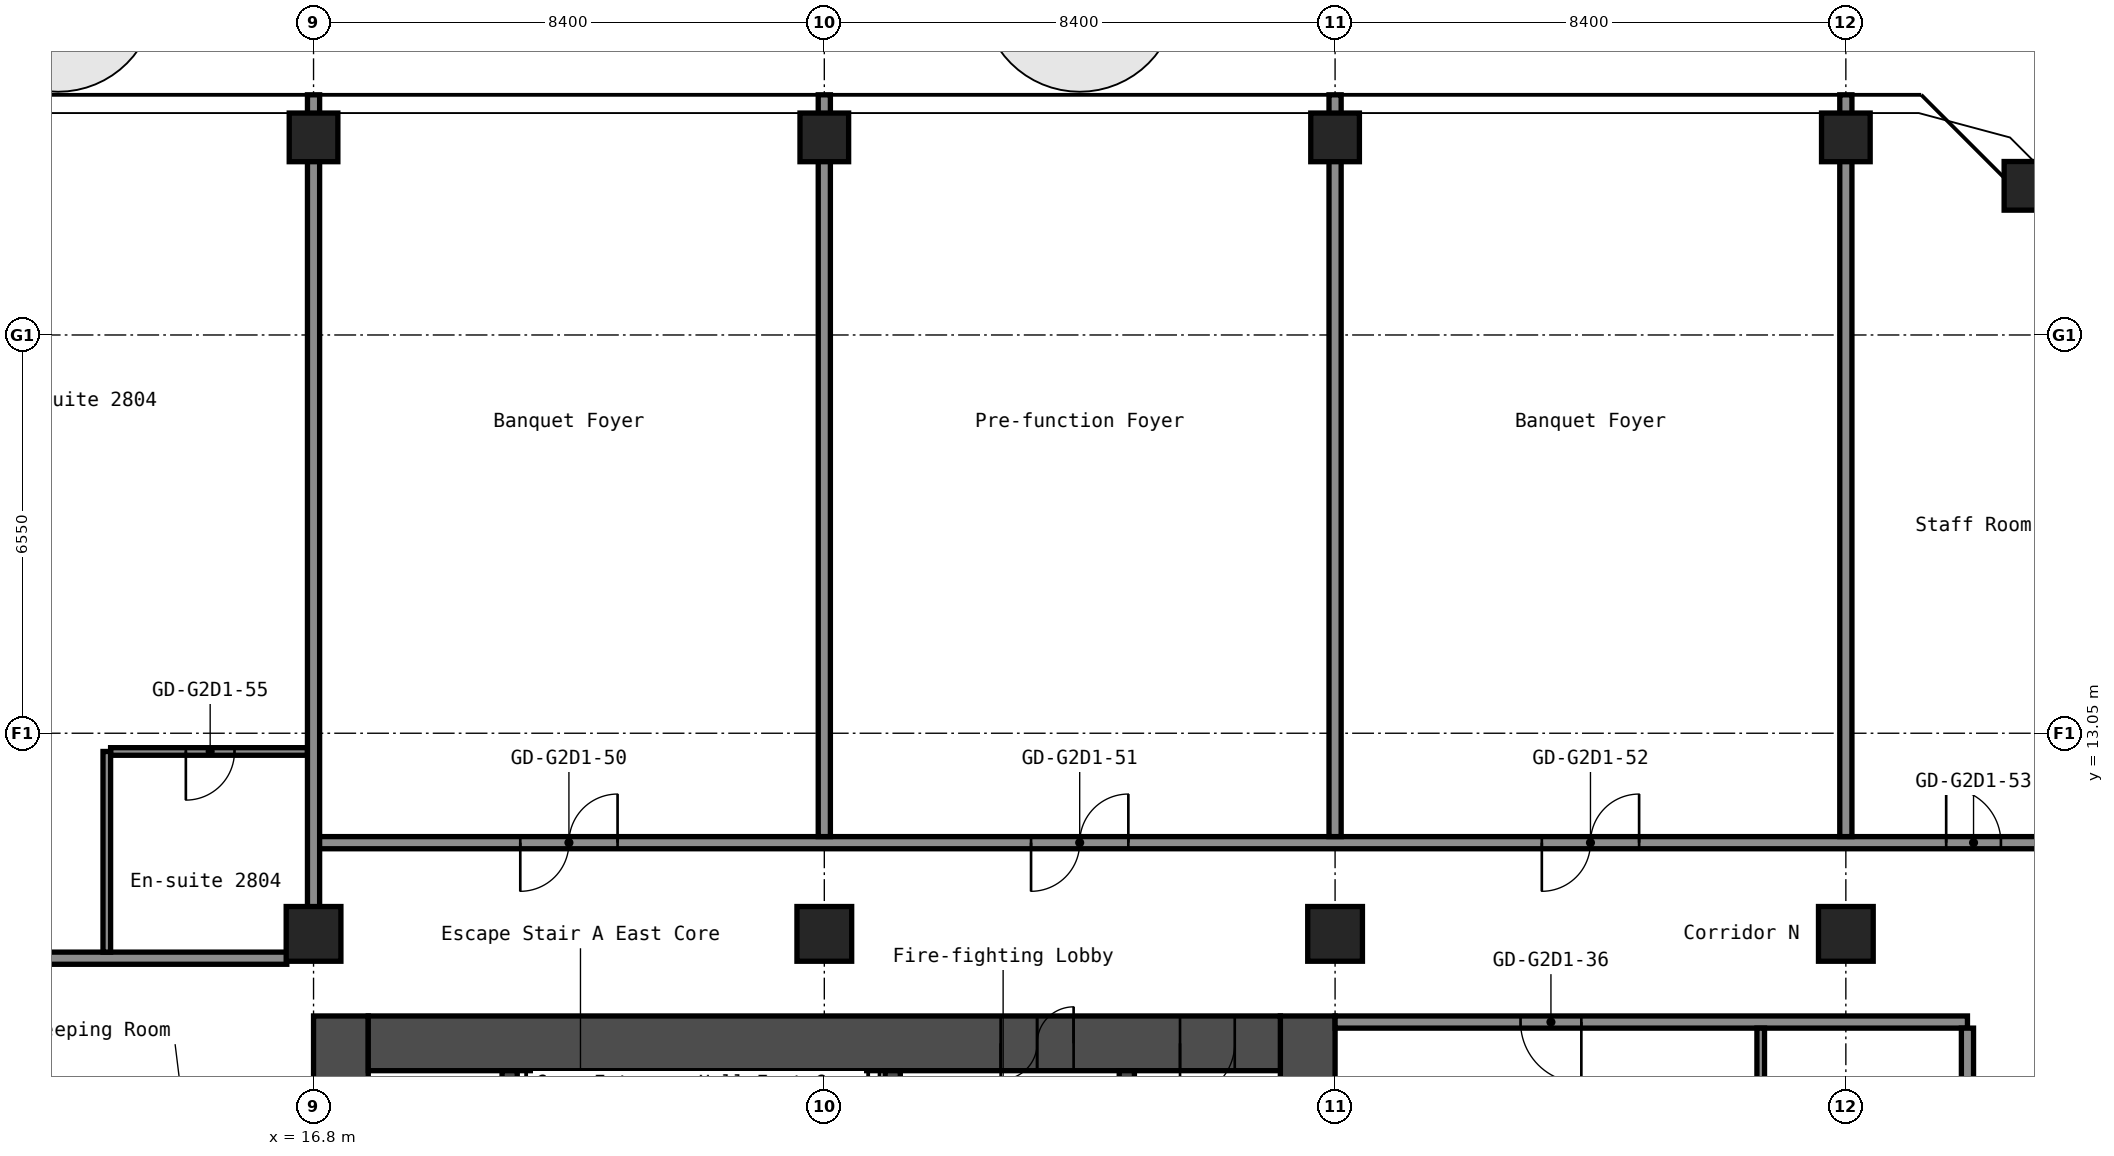
"""IFC4 building model, lengths in metres.
Left out: names, types, materials, properties, quantities, classifications, styles, units other than length and angle.
Written with IfcOpenShell. Run it as: python <this file> out.ifc"""

import sys

from ifc_helpers import new_model, si_unit, direction, frame, frame_2d, origin, origin_2d, place, context, subcontext, project, spatial, rectangle, hollow_rectangle, extrude, element, fill, save


model = new_model("IFC4")
c1 = context("Model", 3, precision=1e-05, world=origin(), true_north=direction((0.0, 1.0)))
c2 = subcontext(c1, "Body", "Model", "MODEL_VIEW")
j1 = project(units=[si_unit("LENGTHUNIT", "METRE"), si_unit("PLANEANGLEUNIT", "RADIAN")], contexts=[c1])
p1 = place(None, origin())
s1 = spatial("IfcSite", under=j1, at=p1, CompositionType="ELEMENT")
p2 = place(p1, origin())
s2 = spatial("IfcBuilding", under=s1, at=p2, CompositionType="ELEMENT")
p3 = place(p2, frame((0.0, 0.0, 101.0)))
s3 = spatial("IfcBuildingStorey", under=s2, at=p3, CompositionType="ELEMENT", Elevation=101.0)
p4 = place(p3, frame((16.8, 9.75, 0.0), z_axis=(0.0, 0.0, 1.0), x_axis=(1.0, 0.0, 0.0)))
e1 = element("IfcColumn", 1, at=p4, inside=s3, PredefinedType="COLUMN", context=c2, shape_type="SweptSolid", body=[
    extrude(hollow_rectangle(XDim=0.9, YDim=0.9, WallThickness=0.036, at=origin_2d()), origin(), (0.0, 0.0, 1.0), 2.8),
])
p5 = place(p3, frame((16.8, 22.85, 0.0), z_axis=(0.0, 0.0, 1.0), x_axis=(1.0, 0.0, 0.0)))
e2 = element("IfcColumn", 2, at=p5, inside=s3, PredefinedType="COLUMN", context=c2, shape_type="SweptSolid", body=[
    extrude(hollow_rectangle(XDim=0.8, YDim=0.8, WallThickness=0.032, at=origin_2d()), origin(), (0.0, 0.0, 1.0), 2.8),
])
p6 = place(p3, frame((25.2, 9.75, 0.0), z_axis=(0.0, 0.0, 1.0), x_axis=(1.0, 0.0, 0.0)))
e3 = element("IfcColumn", 3, at=p6, inside=s3, PredefinedType="COLUMN", context=c2, shape_type="SweptSolid", body=[
    extrude(hollow_rectangle(XDim=0.9, YDim=0.9, WallThickness=0.036, at=origin_2d()), origin(), (0.0, 0.0, 1.0), 2.8),
])
p7 = place(p3, frame((25.2, 22.85, 0.0), z_axis=(0.0, 0.0, 1.0), x_axis=(1.0, 0.0, 0.0)))
e4 = element("IfcColumn", 4, at=p7, inside=s3, PredefinedType="COLUMN", context=c2, shape_type="SweptSolid", body=[
    extrude(hollow_rectangle(XDim=0.8, YDim=0.8, WallThickness=0.032, at=origin_2d()), origin(), (0.0, 0.0, 1.0), 2.8),
])
p8 = place(p3, frame((33.6, 9.75, 0.0), z_axis=(0.0, 0.0, 1.0), x_axis=(1.0, 0.0, 0.0)))
e5 = element("IfcColumn", 5, at=p8, inside=s3, PredefinedType="COLUMN", context=c2, shape_type="SweptSolid", body=[
    extrude(hollow_rectangle(XDim=0.9, YDim=0.9, WallThickness=0.036, at=origin_2d()), origin(), (0.0, 0.0, 1.0), 2.8),
])
p9 = place(p3, frame((33.6, 22.85, 0.0), z_axis=(0.0, 0.0, 1.0), x_axis=(1.0, 0.0, 0.0)))
e6 = element("IfcColumn", 6, at=p9, inside=s3, PredefinedType="COLUMN", context=c2, shape_type="SweptSolid", body=[
    extrude(hollow_rectangle(XDim=0.8, YDim=0.8, WallThickness=0.032, at=origin_2d()), origin(), (0.0, 0.0, 1.0), 2.8),
])
p10 = place(p3, frame((42.0, 9.75, 0.0), z_axis=(0.0, 0.0, 1.0), x_axis=(1.0, 0.0, 0.0)))
e7 = element("IfcColumn", 7, at=p10, inside=s3, PredefinedType="COLUMN", context=c2, shape_type="SweptSolid", body=[
    extrude(hollow_rectangle(XDim=0.9, YDim=0.9, WallThickness=0.036, at=origin_2d()), origin(), (0.0, 0.0, 1.0), 2.8),
])
for number, where, z_axis, x_axis in (
    (8, (42.0, 22.85, 0.0), (0.0, 0.0, 1.0), (1.0, 0.0, 0.0)),
    (9, (45.003, 22.053, 0.0), (0.0, 0.0, 1.0), (1.0, 0.0, 0.0)),
):
    element("IfcColumn", number, at=place(p3, frame(where, z_axis=z_axis, x_axis=x_axis)), inside=s3, PredefinedType="COLUMN", context=c2, shape_type="SweptSolid", body=[
        extrude(hollow_rectangle(XDim=0.8, YDim=0.8, WallThickness=0.032, at=origin_2d()), origin(), (0.0, 0.0, 1.0), 2.8),
    ])
p11 = place(p3, frame((17.25, -8.4, 0.0), z_axis=(0.0, 0.0, 1.0), x_axis=(0.0, 1.0, 0.0)))
e10 = element("IfcWall", 10, at=p11, inside=s3, PredefinedType="SHEAR", context=c2, shape_type="SweptSolid", body=[
    extrude(rectangle(XDim=16.8, YDim=0.9, at=frame_2d((8.4, 0.0))), origin(), (0.0, 0.0, 1.0), 2.8),
])
p12 = place(p11, frame((7.6, 0.0, 0.0)))
e11 = element("IfcOpeningElement", 11, at=p12, cuts=e10, PredefinedType="OPENING", context=c2, shape_type="SweptSolid", body=[
    extrude(rectangle(XDim=1.2, YDim=2.1, at=frame_2d((0.6, 1.05))), frame((0.0, 0.46, 0.0), z_axis=(0.0, -1.0, 0.0), x_axis=(1.0, 0.0, 0.0)), (0.0, 0.0, 1.0), 0.92),
])
p13 = place(p3, frame((33.15, -8.4, 0.0), z_axis=(0.0, 0.0, 1.0), x_axis=(0.0, 1.0, 0.0)))
e12 = element("IfcWall", 12, at=p13, inside=s3, PredefinedType="SHEAR", context=c2, shape_type="SweptSolid", body=[
    extrude(rectangle(XDim=16.8, YDim=0.9, at=frame_2d((8.4, 0.0))), origin(), (0.0, 0.0, 1.0), 2.8),
])
p14 = place(p3, frame((17.7, 7.95, 0.0), z_axis=(0.0, 0.0, 1.0), x_axis=(1.0, 0.0, 0.0)))
e13 = element("IfcWall", 13, at=p14, inside=s3, PredefinedType="SHEAR", context=c2, shape_type="SweptSolid", body=[
    extrude(rectangle(XDim=15.0, YDim=0.9, at=frame_2d((7.5, 0.0))), origin(), (0.0, 0.0, 1.0), 2.8),
])
p15 = place(p14, frame((10.4, 0.0, 0.0)))
e14 = element("IfcOpeningElement", 14, at=p15, cuts=e13, PredefinedType="OPENING", context=c2, shape_type="SweptSolid", body=[
    extrude(rectangle(XDim=1.2, YDim=2.1, at=frame_2d((0.6, 1.05))), frame((0.0, 0.46, 0.0), z_axis=(0.0, -1.0, 0.0), x_axis=(1.0, 0.0, 0.0)), (0.0, 0.0, 1.0), 0.92),
])
p16 = place(p14, frame((13.35, 0.0, 0.0)))
e15 = element("IfcOpeningElement", 15, at=p16, cuts=e13, PredefinedType="OPENING", context=c2, shape_type="SweptSolid", body=[
    extrude(rectangle(XDim=0.9, YDim=2.1, at=frame_2d((0.45, 1.05))), frame((0.0, 0.46, 0.0), z_axis=(0.0, -1.0, 0.0), x_axis=(1.0, 0.0, 0.0)), (0.0, 0.0, 1.0), 0.92),
])
p17 = place(p3, frame((20.025, 1.2, 0.0), z_axis=(0.0, 0.0, 1.0), x_axis=(0.0, 1.0, 0.0)))
e16 = element("IfcWall", 16, at=p17, inside=s3, PredefinedType="SHEAR", context=c2, shape_type="SweptSolid", body=[
    extrude(rectangle(XDim=6.3, YDim=0.25, at=frame_2d((3.15, 0.0))), origin(), (0.0, 0.0, 1.0), 2.8),
])
p18 = place(p3, frame((26.325, 3.75, 0.0), z_axis=(0.0, 0.0, 1.0), x_axis=(0.0, 1.0, 0.0)))
e17 = element("IfcWall", 17, at=p18, inside=s3, PredefinedType="SHEAR", context=c2, shape_type="SweptSolid", body=[
    extrude(rectangle(XDim=3.75, YDim=0.25, at=frame_2d((1.875, 0.0))), origin(), (0.0, 0.0, 1.0), 2.8),
])
p19 = place(p18, frame((1.25, 0.0, 0.0)))
e18 = element("IfcOpeningElement", 18, at=p19, cuts=e17, PredefinedType="OPENING", context=c2, shape_type="SweptSolid", body=[
    extrude(rectangle(XDim=1.2, YDim=2.1, at=frame_2d((0.6, 1.05))), frame((0.0, 0.135, 0.0), z_axis=(0.0, -1.0, 0.0), x_axis=(1.0, 0.0, 0.0)), (0.0, 0.0, 1.0), 0.27),
])
p20 = place(p3, frame((30.175, 1.45, 0.0), z_axis=(0.0, 0.0, 1.0), x_axis=(0.0, 1.0, 0.0)))
e19 = element("IfcWall", 19, at=p20, inside=s3, PredefinedType="SHEAR", context=c2, shape_type="SweptSolid", body=[
    extrude(rectangle(XDim=6.05, YDim=0.25, at=frame_2d((3.025, 0.0))), origin(), (0.0, 0.0, 1.0), 2.8),
])
p21 = place(p20, frame((2.625, 0.0, 0.0)))
e20 = element("IfcOpeningElement", 20, at=p21, cuts=e19, PredefinedType="OPENING", context=c2, shape_type="SweptSolid", body=[
    extrude(rectangle(XDim=1.1, YDim=2.1, at=frame_2d((0.55, 1.05))), frame((0.0, 0.135, 0.0), z_axis=(0.0, -1.0, 0.0), x_axis=(1.0, 0.0, 0.0)), (0.0, 0.0, 1.0), 0.27),
])
p22 = place(p3, frame((33.6, 8.3, 0.0), z_axis=(0.0, 0.0, 1.0), x_axis=(1.0, 0.0, 0.0)))
e21 = element("IfcWall", 21, at=p22, inside=s3, PredefinedType="PARTITIONING", context=c2, shape_type="SweptSolid", body=[
    extrude(rectangle(XDim=10.4, YDim=0.2, at=frame_2d((5.2, 0.0))), origin(), (0.0, 0.0, 1.0), 2.8),
])
p23 = place(p22, frame((3.05, 0.0, 0.0)))
e22 = element("IfcOpeningElement", 22, at=p23, cuts=e21, PredefinedType="OPENING", context=c2, shape_type="SweptSolid", body=[
    extrude(rectangle(XDim=1.0, YDim=2.1, at=frame_2d((0.5, 1.05))), frame((0.0, 0.11, 0.0), z_axis=(0.0, -1.0, 0.0), x_axis=(1.0, 0.0, 0.0)), (0.0, 0.0, 1.0), 0.22),
])
p24 = place(p3, frame((-16.36, 9.35, 0.0), z_axis=(0.0, 0.0, 1.0), x_axis=(1.0, 0.0, 0.0)))
e23 = element("IfcWall", 23, at=p24, inside=s3, PredefinedType="PARTITIONING", context=c2, shape_type="SweptSolid", body=[
    extrude(rectangle(XDim=32.72, YDim=0.2, at=frame_2d((16.36, 0.0))), origin(), (0.0, 0.0, 1.0), 2.8),
])
p25 = place(p24, frame((2.41, 0.0, 0.0)))
e24 = element("IfcOpeningElement", 24, at=p25, cuts=e23, PredefinedType="OPENING", context=c2, shape_type="SweptSolid", body=[
    extrude(rectangle(XDim=1.0, YDim=2.1, at=frame_2d((0.5, 1.05))), frame((0.0, 0.11, 0.0), z_axis=(0.0, -1.0, 0.0), x_axis=(1.0, 0.0, 0.0)), (0.0, 0.0, 1.0), 0.22),
])
p26 = place(p24, frame((4.11, 0.0, 0.0)))
e25 = element("IfcOpeningElement", 25, at=p26, cuts=e23, PredefinedType="OPENING", context=c2, shape_type="SweptSolid", body=[
    extrude(rectangle(XDim=1.0, YDim=2.1, at=frame_2d((0.5, 1.05))), frame((0.0, 0.11, 0.0), z_axis=(0.0, -1.0, 0.0), x_axis=(1.0, 0.0, 0.0)), (0.0, 0.0, 1.0), 0.22),
])
p27 = place(p24, frame((13.36, 0.0, 0.0)))
e26 = element("IfcOpeningElement", 26, at=p27, cuts=e23, PredefinedType="OPENING", context=c2, shape_type="SweptSolid", body=[
    extrude(rectangle(XDim=1.0, YDim=2.1, at=frame_2d((0.5, 1.05))), frame((0.0, 0.11, 0.0), z_axis=(0.0, -1.0, 0.0), x_axis=(1.0, 0.0, 0.0)), (0.0, 0.0, 1.0), 0.22),
])
p28 = place(p24, frame((19.21, 0.0, 0.0)))
e27 = element("IfcOpeningElement", 27, at=p28, cuts=e23, PredefinedType="OPENING", context=c2, shape_type="SweptSolid", body=[
    extrude(rectangle(XDim=1.0, YDim=2.1, at=frame_2d((0.5, 1.05))), frame((0.0, 0.11, 0.0), z_axis=(0.0, -1.0, 0.0), x_axis=(1.0, 0.0, 0.0)), (0.0, 0.0, 1.0), 0.22),
])
p29 = place(p24, frame((20.91, 0.0, 0.0)))
e28 = element("IfcOpeningElement", 28, at=p29, cuts=e23, PredefinedType="OPENING", context=c2, shape_type="SweptSolid", body=[
    extrude(rectangle(XDim=1.0, YDim=2.1, at=frame_2d((0.5, 1.05))), frame((0.0, 0.11, 0.0), z_axis=(0.0, -1.0, 0.0), x_axis=(1.0, 0.0, 0.0)), (0.0, 0.0, 1.0), 0.22),
])
p30 = place(p24, frame((26.76, 0.0, 0.0)))
e29 = element("IfcOpeningElement", 29, at=p30, cuts=e23, PredefinedType="OPENING", context=c2, shape_type="SweptSolid", body=[
    extrude(rectangle(XDim=1.0, YDim=2.1, at=frame_2d((0.5, 1.05))), frame((0.0, 0.11, 0.0), z_axis=(0.0, -1.0, 0.0), x_axis=(1.0, 0.0, 0.0)), (0.0, 0.0, 1.0), 0.22),
])
p31 = place(p3, frame((16.8, 11.25, 0.0), z_axis=(0.0, 0.0, 1.0), x_axis=(1.0, 0.0, 0.0)))
e30 = element("IfcWall", 30, at=p31, inside=s3, PredefinedType="PARTITIONING", context=c2, shape_type="SweptSolid", body=[
    extrude(rectangle(XDim=29.7, YDim=0.2, at=frame_2d((14.85, 0.0))), origin(), (0.0, 0.0, 1.0), 2.8),
])
p32 = place(p31, frame((3.4, 0.0, 0.0)))
e31 = element("IfcOpeningElement", 31, at=p32, cuts=e30, PredefinedType="OPENING", context=c2, shape_type="SweptSolid", body=[
    extrude(rectangle(XDim=1.6, YDim=2.1, at=frame_2d((0.8, 1.05))), frame((0.0, 0.11, 0.0), z_axis=(0.0, -1.0, 0.0), x_axis=(1.0, 0.0, 0.0)), (0.0, 0.0, 1.0), 0.22),
])
p33 = place(p31, frame((11.8, 0.0, 0.0)))
e32 = element("IfcOpeningElement", 32, at=p33, cuts=e30, PredefinedType="OPENING", context=c2, shape_type="SweptSolid", body=[
    extrude(rectangle(XDim=1.6, YDim=2.1, at=frame_2d((0.8, 1.05))), frame((0.0, 0.11, 0.0), z_axis=(0.0, -1.0, 0.0), x_axis=(1.0, 0.0, 0.0)), (0.0, 0.0, 1.0), 0.22),
])
p34 = place(p31, frame((20.2, 0.0, 0.0)))
e33 = element("IfcOpeningElement", 33, at=p34, cuts=e30, PredefinedType="OPENING", context=c2, shape_type="SweptSolid", body=[
    extrude(rectangle(XDim=1.6, YDim=2.1, at=frame_2d((0.8, 1.05))), frame((0.0, 0.11, 0.0), z_axis=(0.0, -1.0, 0.0), x_axis=(1.0, 0.0, 0.0)), (0.0, 0.0, 1.0), 0.22),
])
p35 = place(p31, frame((26.85, 0.0, 0.0)))
e34 = element("IfcOpeningElement", 34, at=p35, cuts=e30, PredefinedType="OPENING", context=c2, shape_type="SweptSolid", body=[
    extrude(rectangle(XDim=0.9, YDim=2.1, at=frame_2d((0.45, 1.05))), frame((0.0, 0.11, 0.0), z_axis=(0.0, -1.0, 0.0), x_axis=(1.0, 0.0, 0.0)), (0.0, 0.0, 1.0), 0.22),
])
p36 = place(p3, frame((13.462, 12.75, 0.0), z_axis=(0.0, 0.0, 1.0), x_axis=(1.0, 0.0, 0.0)))
e35 = element("IfcWall", 35, at=p36, inside=s3, PredefinedType="PARTITIONING", context=c2, shape_type="SweptSolid", body=[
    extrude(rectangle(XDim=3.238, YDim=0.125, at=frame_2d((1.619, 0.0))), origin(), (0.0, 0.0, 1.0), 2.8),
])
p37 = place(p36, frame((1.238, 0.0, 0.0)))
e36 = element("IfcOpeningElement", 36, at=p37, cuts=e35, PredefinedType="OPENING", context=c2, shape_type="SweptSolid", body=[
    extrude(rectangle(XDim=0.8, YDim=2.1, at=frame_2d((0.4, 1.05))), frame((0.0, 0.073, 0.0), z_axis=(0.0, -1.0, 0.0), x_axis=(1.0, 0.0, 0.0)), (0.0, 0.0, 1.0), 0.145),
])
p38 = place(p3, frame((13.4, 9.45, 0.0), z_axis=(0.0, 0.0, 1.0), x_axis=(0.0, 1.0, 0.0)))
e37 = element("IfcWall", 37, at=p38, inside=s3, PredefinedType="PARTITIONING", context=c2, shape_type="SweptSolid", body=[
    extrude(rectangle(XDim=3.3, YDim=0.125, at=frame_2d((1.65, 0.0))), origin(), (0.0, 0.0, 1.0), 2.8),
])
p39 = place(p3, frame((16.8, 10.19, 0.0), z_axis=(0.0, 0.0, 1.0), x_axis=(0.0, 1.0, 0.0)))
e38 = element("IfcWall", 38, at=p39, inside=s3, PredefinedType="PARTITIONING", context=c2, shape_type="SweptSolid", body=[
    extrude(rectangle(XDim=13.36, YDim=0.2, at=frame_2d((6.68, 0.0))), origin(), (0.0, 0.0, 1.0), 2.8),
])
for number, where, z_axis, x_axis in (
    (39, (25.2, 11.35, 0.0), (0.0, 0.0, 1.0), (0.0, 1.0, 0.0)),
    (40, (33.6, 11.35, 0.0), (0.0, 0.0, 1.0), (0.0, 1.0, 0.0)),
):
    element("IfcWall", number, at=place(p3, frame(where, z_axis=z_axis, x_axis=x_axis)), inside=s3, PredefinedType="PARTITIONING", context=c2, shape_type="SweptSolid", body=[
        extrude(rectangle(XDim=12.2, YDim=0.2, at=frame_2d((6.1, 0.0))), origin(), (0.0, 0.0, 1.0), 2.8),
    ])
p40 = place(p3, frame((40.6, 4.9, 0.0), z_axis=(0.0, 0.0, 1.0), x_axis=(0.0, 1.0, 0.0)))
e41 = element("IfcWall", 41, at=p40, inside=s3, PredefinedType="PARTITIONING", context=c2, shape_type="SweptSolid", body=[
    extrude(rectangle(XDim=3.3, YDim=0.125, at=frame_2d((1.65, 0.0))), origin(), (0.0, 0.0, 1.0), 2.8),
])
p41 = place(p3, frame((42.0, 11.35, 0.0), z_axis=(0.0, 0.0, 1.0), x_axis=(0.0, 1.0, 0.0)))
e42 = element("IfcWall", 42, at=p41, inside=s3, PredefinedType="PARTITIONING", context=c2, shape_type="SweptSolid", body=[
    extrude(rectangle(XDim=12.2, YDim=0.2, at=frame_2d((6.1, 0.0))), origin(), (0.0, 0.0, 1.0), 2.8),
])
p42 = place(p3, frame((44.0, -8.2, 0.0), z_axis=(0.0, 0.0, 1.0), x_axis=(0.0, 1.0, 0.0)))
e43 = element("IfcWall", 43, at=p42, inside=s3, PredefinedType="PARTITIONING", context=c2, shape_type="SweptSolid", body=[
    extrude(rectangle(XDim=16.4, YDim=0.2, at=frame_2d((8.2, 0.0))), origin(), (0.0, 0.0, 1.0), 2.8),
])
p43 = place(p15, origin())
e44 = element("IfcDoor", 44, at=p43, inside=s3, OperationType="DOUBLE_DOOR_SINGLE_SWING", PredefinedType="DOOR", context=c2, shape_type="SweptSolid", body=[
    extrude(rectangle(XDim=1.2, YDim=2.1, at=frame_2d((0.6, 1.05))), frame((0.0, 0.025, 0.0), z_axis=(0.0, -1.0, 0.0), x_axis=(1.0, 0.0, 0.0)), (0.0, 0.0, 1.0), 0.05),
])
fill(e14, e44)
p44 = place(p16, origin())
e45 = element("IfcDoor", 45, at=p44, inside=s3, OperationType="SINGLE_SWING_LEFT", PredefinedType="DOOR", context=c2, shape_type="SweptSolid", body=[
    extrude(rectangle(XDim=0.9, YDim=2.1, at=frame_2d((0.45, 1.05))), frame((0.0, 0.025, 0.0), z_axis=(0.0, -1.0, 0.0), x_axis=(1.0, 0.0, 0.0)), (0.0, 0.0, 1.0), 0.05),
])
fill(e15, e45)
p45 = place(p23, origin())
e46 = element("IfcDoor", 46, at=p45, inside=s3, OperationType="SINGLE_SWING_RIGHT", PredefinedType="DOOR", context=c2, shape_type="SweptSolid", body=[
    extrude(rectangle(XDim=1.0, YDim=2.1, at=frame_2d((0.5, 1.05))), frame((0.0, 0.025, 0.0), z_axis=(0.0, -1.0, 0.0), x_axis=(1.0, 0.0, 0.0)), (0.0, 0.0, 1.0), 0.05),
])
fill(e22, e46)
p46 = place(p32, origin())
e47 = element("IfcDoor", 47, at=p46, inside=s3, OperationType="DOUBLE_DOOR_SINGLE_SWING", PredefinedType="DOOR", context=c2, shape_type="SweptSolid", body=[
    extrude(rectangle(XDim=1.6, YDim=2.1, at=frame_2d((0.8, 1.05))), frame((0.0, 0.025, 0.0), z_axis=(0.0, -1.0, 0.0), x_axis=(1.0, 0.0, 0.0)), (0.0, 0.0, 1.0), 0.05),
])
fill(e31, e47)
p47 = place(p33, origin())
e48 = element("IfcDoor", 48, at=p47, inside=s3, OperationType="DOUBLE_DOOR_SINGLE_SWING", PredefinedType="DOOR", context=c2, shape_type="SweptSolid", body=[
    extrude(rectangle(XDim=1.6, YDim=2.1, at=frame_2d((0.8, 1.05))), frame((0.0, 0.025, 0.0), z_axis=(0.0, -1.0, 0.0), x_axis=(1.0, 0.0, 0.0)), (0.0, 0.0, 1.0), 0.05),
])
fill(e32, e48)
p48 = place(p34, origin())
e49 = element("IfcDoor", 49, at=p48, inside=s3, OperationType="DOUBLE_DOOR_SINGLE_SWING", PredefinedType="DOOR", context=c2, shape_type="SweptSolid", body=[
    extrude(rectangle(XDim=1.6, YDim=2.1, at=frame_2d((0.8, 1.05))), frame((0.0, 0.025, 0.0), z_axis=(0.0, -1.0, 0.0), x_axis=(1.0, 0.0, 0.0)), (0.0, 0.0, 1.0), 0.05),
])
fill(e33, e49)
p49 = place(p35, origin())
e50 = element("IfcDoor", 50, at=p49, inside=s3, OperationType="SINGLE_SWING_RIGHT", PredefinedType="DOOR", context=c2, shape_type="SweptSolid", body=[
    extrude(rectangle(XDim=0.9, YDim=2.1, at=frame_2d((0.45, 1.05))), frame((0.0, 0.025, 0.0), z_axis=(0.0, -1.0, 0.0), x_axis=(1.0, 0.0, 0.0)), (0.0, 0.0, 1.0), 0.05),
])
fill(e34, e50)
p50 = place(p37, origin())
e51 = element("IfcDoor", 51, at=p50, inside=s3, OperationType="SINGLE_SWING_LEFT", PredefinedType="DOOR", context=c2, shape_type="SweptSolid", body=[
    extrude(rectangle(XDim=0.8, YDim=2.1, at=frame_2d((0.4, 1.05))), frame((0.0, 0.025, 0.0), z_axis=(0.0, -1.0, 0.0), x_axis=(1.0, 0.0, 0.0)), (0.0, 0.0, 1.0), 0.05),
])
fill(e36, e51)
save(model, sys.argv[1])
